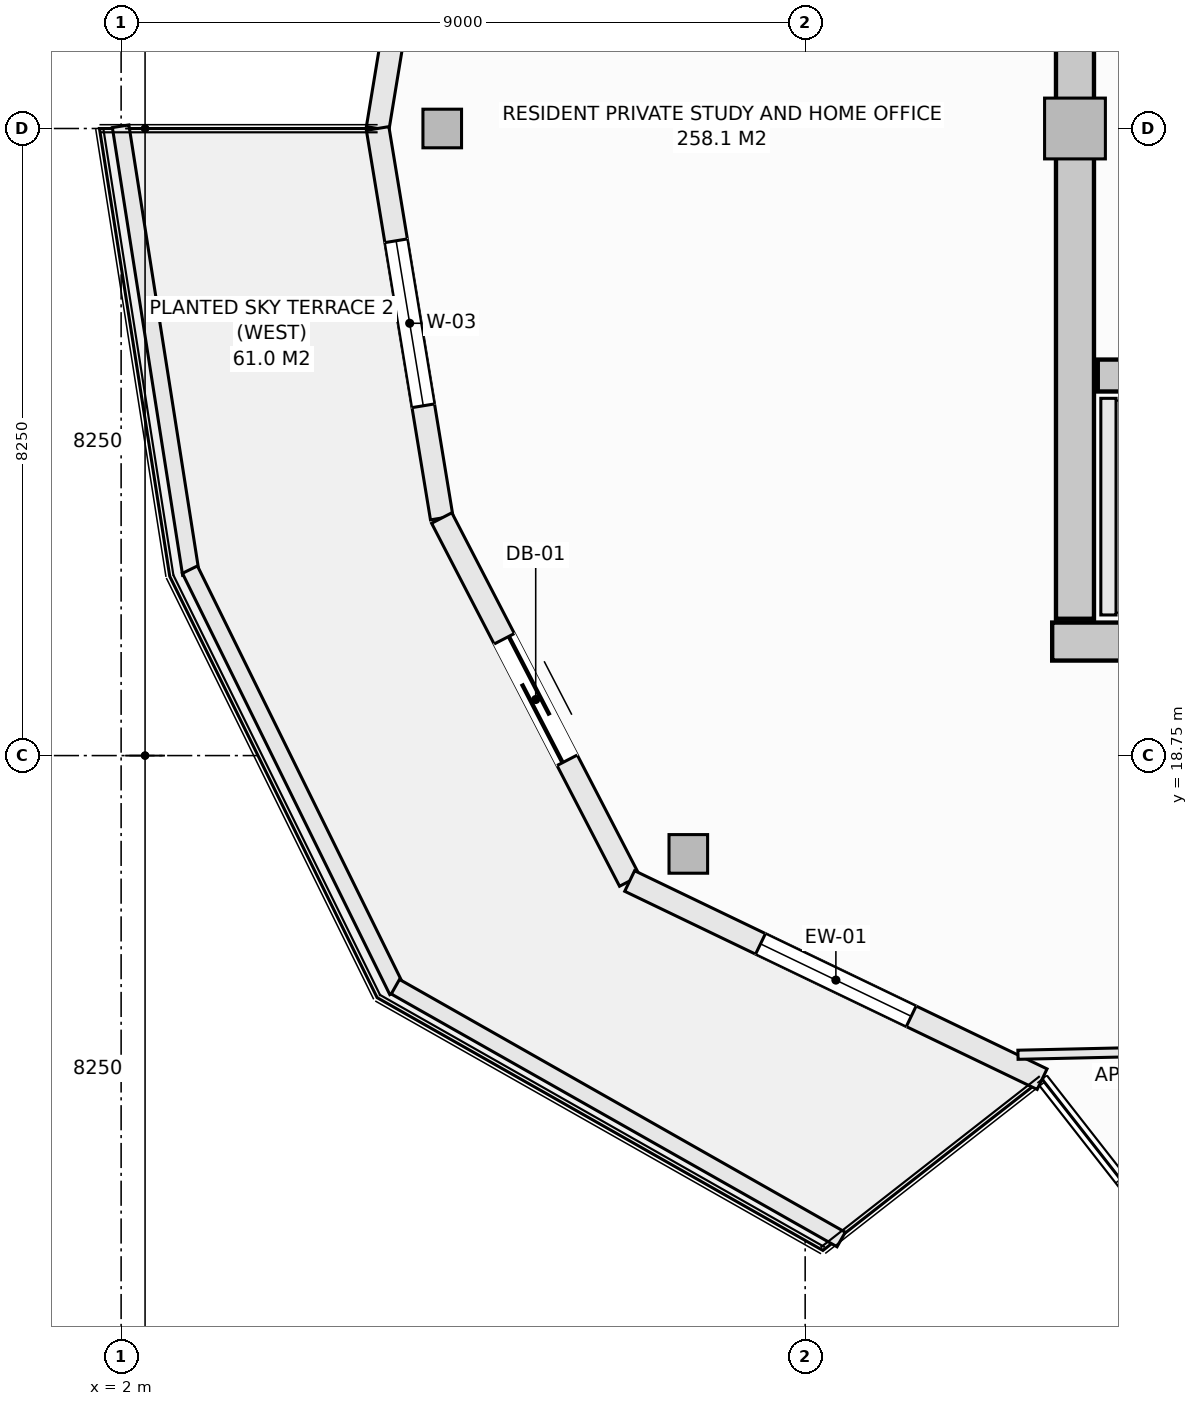
"""IFC4 building model, lengths in metres.
Left out: names, types, materials, properties, quantities, classifications, styles, units other than length and angle.
Written with IfcOpenShell. Run it as: python <this file> out.ifc"""

import sys

from ifc_helpers import new_model, si_unit, direction, frame, frame_2d, origin, origin_2d, place, context, subcontext, project, spatial, rectangle, hollow_rectangle, extrude, element, fill, save


model = new_model("IFC4")
c1 = context("Model", 3, precision=1e-05, world=origin(), true_north=direction((0.0, 1.0)))
c2 = subcontext(c1, "Body", "Model", "MODEL_VIEW")
j1 = project(units=[si_unit("LENGTHUNIT", "METRE"), si_unit("PLANEANGLEUNIT", "RADIAN")], contexts=[c1])
p1 = place(None, origin())
s1 = spatial("IfcSite", under=j1, at=p1, CompositionType="ELEMENT")
p2 = place(p1, origin())
s2 = spatial("IfcBuilding", under=s1, at=p2, CompositionType="ELEMENT")
p3 = place(p2, frame((0.0, 0.0, 226.1)))
s3 = spatial("IfcBuildingStorey", under=s2, at=p3, CompositionType="ELEMENT", Elevation=226.1)
p4 = place(p3, frame((14.25, 20.25, -0.27), z_axis=(0.0, 0.0, 1.0), x_axis=(1.0, 0.0, 0.0)))
e1 = element("IfcWall", 1, at=p4, inside=s3, PredefinedType="SHEAR", context=c2, shape_type="SweptSolid", body=[
    extrude(rectangle(XDim=13.5, YDim=0.5, at=frame_2d((6.75, 0.0))), origin(), (0.0, 0.0, 1.0), 3.3),
])
p5 = place(p3, frame((14.55, 20.55, -0.27), z_axis=(0.0, 0.0, 1.0), x_axis=(0.0, 1.0, 0.0)))
e2 = element("IfcWall", 2, at=p5, inside=s3, PredefinedType="SHEAR", context=c2, shape_type="SweptSolid", body=[
    extrude(rectangle(XDim=12.9, YDim=0.5, at=frame_2d((6.45, 0.0))), origin(), (0.0, 0.0, 1.0), 3.3),
])
p6 = place(p3, frame((14.85, 23.75, -0.27), z_axis=(0.0, 0.0, 1.0), x_axis=(1.0, 0.0, 0.0)))
e3 = element("IfcWall", 3, at=p6, inside=s3, PredefinedType="SHEAR", context=c2, shape_type="SweptSolid", body=[
    extrude(rectangle(XDim=7.3, YDim=0.42, at=frame_2d((3.65, 0.0))), origin(), (0.0, 0.0, 1.0), 3.3),
])
for number, where, z_axis, x_axis in (
    (4, (6.225, 27.0, -0.27), (0.0, 0.0, 1.0), (1.0, 0.0, 0.0)),
    (5, (9.463, 17.456, -0.27), (0.0, 0.0, 1.0), (1.0, 0.0, 0.0)),
):
    element("IfcColumn", number, at=place(p3, frame(where, z_axis=z_axis, x_axis=x_axis)), inside=s3, PredefinedType="COLUMN", context=c2, shape_type="SweptSolid", body=[
        extrude(hollow_rectangle(XDim=0.508, YDim=0.508, WallThickness=0.019, at=origin_2d()), origin(), (0.0, 0.0, 1.0), 3.3),
    ])
p7 = place(p3, frame((14.55, 27.0, -0.27), z_axis=(0.0, 0.0, 1.0), x_axis=(1.0, 0.0, 0.0)))
e6 = element("IfcColumn", 6, at=p7, inside=s3, PredefinedType="PILASTER", context=c2, shape_type="SweptSolid", body=[
    extrude(rectangle(XDim=0.8, YDim=0.8, at=origin_2d()), origin(), (0.0, 0.0, 1.0), 3.3),
])
p8 = place(p3, frame((5.375, 27.0, 0.0), z_axis=(0.0, 0.0, 1.0), x_axis=(0.16237087798, 0.986729799886, 0.0)))
e7 = element("IfcWall", 7, at=p8, inside=s3, PredefinedType="SOLIDWALL", context=c2, shape_type="SweptSolid", body=[
    extrude(rectangle(XDim=5.193, YDim=0.3, at=frame_2d((2.597, 0.0))), origin(), (0.0, 0.0, 1.0), 2.605),
])
p9 = place(p8, frame((1.497, 0.0, 0.72)))
e8 = element("IfcOpeningElement", 8, at=p9, cuts=e7, PredefinedType="OPENING", context=c2, shape_type="SweptSolid", body=[
    extrude(rectangle(XDim=2.2, YDim=1.65, at=frame_2d((1.1, 0.825))), frame((0.0, 0.16, 0.0), z_axis=(0.0, -1.0, 0.0), x_axis=(1.0, 0.0, 0.0)), (0.0, 0.0, 1.0), 0.32),
])
p10 = place(p3, frame((5.375, 27.0, 0.0), z_axis=(0.0, 0.0, 1.0), x_axis=(0.16237087798, -0.986729799886, 0.0)))
e9 = element("IfcWall", 9, at=p10, inside=s3, PredefinedType="SOLIDWALL", context=c2, shape_type="SweptSolid", body=[
    extrude(rectangle(XDim=5.193, YDim=0.3, at=frame_2d((2.597, 0.0))), origin(), (0.0, 0.0, 1.0), 2.605),
])
p11 = place(p10, frame((1.497, 0.0, 0.72)))
e10 = element("IfcOpeningElement", 10, at=p11, cuts=e9, PredefinedType="OPENING", context=c2, shape_type="SweptSolid", body=[
    extrude(rectangle(XDim=2.2, YDim=1.65, at=frame_2d((1.1, 0.825))), frame((0.0, 0.16, 0.0), z_axis=(0.0, -1.0, 0.0), x_axis=(1.0, 0.0, 0.0)), (0.0, 0.0, 1.0), 0.32),
])
p12 = place(p3, frame((6.218, 21.875, 0.0), z_axis=(0.0, 0.0, 1.0), x_axis=(0.459808219482, -0.888018243786, 0.0)))
e11 = element("IfcWall", 11, at=p12, inside=s3, PredefinedType="SOLIDWALL", context=c2, shape_type="SweptSolid", body=[
    extrude(rectangle(XDim=5.378, YDim=0.3, at=frame_2d((2.689, 0.0))), origin(), (0.0, 0.0, 1.0), 2.605),
])
p13 = place(p12, frame((1.789, 0.0, 0.0)))
e12 = element("IfcOpeningElement", 12, at=p13, cuts=e11, PredefinedType="OPENING", context=c2, shape_type="SweptSolid", body=[
    extrude(rectangle(XDim=1.8, YDim=2.25, at=frame_2d((0.9, 1.125))), frame((0.0, 0.16, 0.0), z_axis=(0.0, -1.0, 0.0), x_axis=(1.0, 0.0, 0.0)), (0.0, 0.0, 1.0), 0.32),
])
p14 = place(p3, frame((8.691, 17.1, 0.0), z_axis=(0.0, 0.0, 1.0), x_axis=(0.901348331142, -0.433094892545, 0.0)))
e13 = element("IfcWall", 13, at=p14, inside=s3, PredefinedType="SOLIDWALL", context=c2, shape_type="SweptSolid", body=[
    extrude(rectangle(XDim=6.021, YDim=0.3, at=frame_2d((3.01, 0.0))), origin(), (0.0, 0.0, 1.0), 2.605),
])
p15 = place(p14, frame((1.91, 0.0, 0.72)))
e14 = element("IfcOpeningElement", 14, at=p15, cuts=e13, PredefinedType="OPENING", context=c2, shape_type="SweptSolid", body=[
    extrude(rectangle(XDim=2.2, YDim=1.65, at=frame_2d((1.1, 0.825))), frame((0.0, 0.16, 0.0), z_axis=(0.0, -1.0, 0.0), x_axis=(1.0, 0.0, 0.0)), (0.0, 0.0, 1.0), 0.32),
])
p16 = place(p3, frame((1.993, 27.029, 0.0), z_axis=(0.0, 0.0, 1.0), x_axis=(0.1550711793, -0.987903299595, 0.0)))
e15 = element("IfcWall", 15, at=p16, inside=s3, PredefinedType="PARAPET", context=c2, shape_type="SweptSolid", body=[
    extrude(rectangle(XDim=5.964, YDim=0.22, at=frame_2d((2.982, 0.0))), origin(), (0.0, 0.0, 1.0), 0.52),
])
p17 = place(p3, frame((2.906, 21.196, 0.0), z_axis=(0.0, 0.0, 1.0), x_axis=(0.441640961804, -0.897191875162, 0.0)))
e16 = element("IfcWall", 16, at=p17, inside=s3, PredefinedType="PARAPET", context=c2, shape_type="SweptSolid", body=[
    extrude(rectangle(XDim=6.178, YDim=0.22, at=frame_2d((3.089, 0.0))), origin(), (0.0, 0.0, 1.0), 0.52),
])
p18 = place(p3, frame((5.608, 15.709, 0.0), z_axis=(0.0, 0.0, 1.0), x_axis=(0.869860619267, -0.493297580623, 0.0)))
e17 = element("IfcWall", 17, at=p18, inside=s3, PredefinedType="PARAPET", context=c2, shape_type="SweptSolid", body=[
    extrude(rectangle(XDim=6.743, YDim=0.22, at=frame_2d((3.371, 0.0))), origin(), (0.0, 0.0, 1.0), 0.52),
])
p19 = place(p3, frame((14.99, 20.6, 0.0), z_axis=(0.0, 0.0, 1.0), x_axis=(0.0, 1.0, 0.0)))
e18 = element("IfcWall", 18, at=p19, inside=s3, PredefinedType="SOLIDWALL", context=c2, shape_type="SweptSolid", body=[
    extrude(rectangle(XDim=2.85, YDim=0.2, at=frame_2d((1.425, 0.0))), origin(), (0.0, 0.0, 1.0), 3.03),
])
p20 = place(p3, frame((13.8, 14.814, 0.0), z_axis=(0.0, 0.0, 1.0), x_axis=(0.999752677802, 0.022239227231, 0.0)))
e19 = element("IfcWall", 19, at=p20, inside=s3, PredefinedType="PARTITIONING", context=c2, shape_type="SweptSolid", body=[
    extrude(rectangle(XDim=13.261, YDim=0.12, at=frame_2d((6.631, 0.0))), origin(), (0.0, 0.0, 1.0), 2.478),
])
p21 = place(p11, origin())
e20 = element("IfcWindow", 20, at=p21, inside=s3, PartitioningType="SINGLE_PANEL", PredefinedType="WINDOW", context=c2, shape_type="SweptSolid", body=[
    extrude(rectangle(XDim=2.2, YDim=1.65, at=frame_2d((1.1, 0.825))), frame((0.0, 0.03, 0.0), z_axis=(0.0, -1.0, 0.0), x_axis=(1.0, 0.0, 0.0)), (0.0, 0.0, 1.0), 0.06),
])
fill(e10, e20)
p22 = place(p13, frame((1.8, 0.0, 0.0), z_axis=(0.0, 0.0, 1.0), x_axis=(-1.0, 0.0, 0.0)))
e21 = element("IfcDoor", 21, at=p22, inside=s3, OperationType="SLIDING_TO_LEFT", PredefinedType="DOOR", context=c2, shape_type="SweptSolid", body=[
    extrude(rectangle(XDim=1.8, YDim=2.25, at=frame_2d((0.9, 1.125))), frame((0.0, 0.025, 0.0), z_axis=(0.0, -1.0, 0.0), x_axis=(1.0, 0.0, 0.0)), (0.0, 0.0, 1.0), 0.05),
])
fill(e12, e21)
p23 = place(p15, origin())
e22 = element("IfcWindow", 22, at=p23, inside=s3, PartitioningType="SINGLE_PANEL", PredefinedType="WINDOW", context=c2, shape_type="SweptSolid", body=[
    extrude(rectangle(XDim=2.2, YDim=1.65, at=frame_2d((1.1, 0.825))), frame((0.0, 0.03, 0.0), z_axis=(0.0, -1.0, 0.0), x_axis=(1.0, 0.0, 0.0)), (0.0, 0.0, 1.0), 0.06),
])
fill(e14, e22)
save(model, sys.argv[1])
